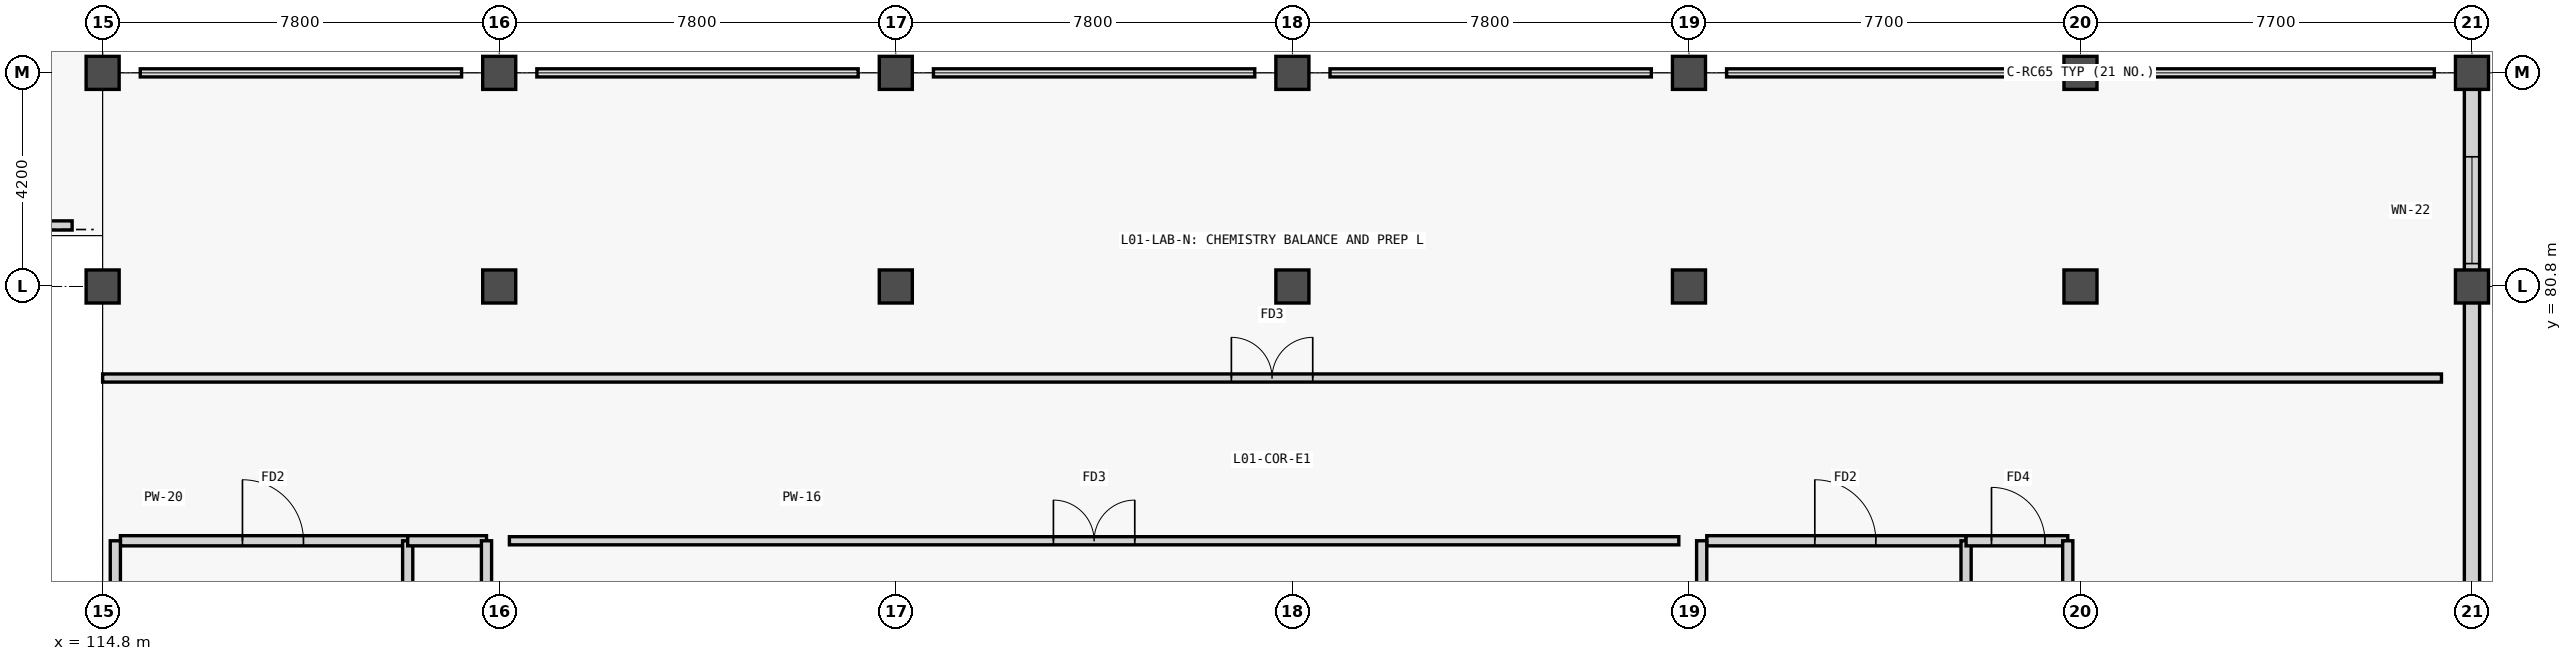
"""IFC4 building model, lengths in metres.
Left out: names, types, materials, properties, quantities, classifications, styles, units other than length and angle.
Written with IfcOpenShell. Run it as: python <this file> out.ifc"""

import sys

from ifc_helpers import new_model, si_unit, direction, frame, frame_2d, origin, origin_2d, place, context, subcontext, project, spatial, rectangle, extrude, element, fill, save


model = new_model("IFC4")
c1 = context("Model", 3, precision=1e-05, world=origin(), true_north=direction((0.0, 1.0)))
c2 = subcontext(c1, "Body", "Model", "MODEL_VIEW")
j1 = project(units=[si_unit("LENGTHUNIT", "METRE"), si_unit("PLANEANGLEUNIT", "RADIAN")], contexts=[c1])
p1 = place(None, origin())
s1 = spatial("IfcSite", under=j1, at=p1, CompositionType="ELEMENT")
p2 = place(p1, origin())
s2 = spatial("IfcBuilding", under=s1, at=p2, CompositionType="ELEMENT")
p3 = place(p2, frame((0.0, 0.0, 5.4)))
s3 = spatial("IfcBuildingStorey", under=s2, at=p3, CompositionType="ELEMENT", Elevation=5.4)
for number, where, z_axis, x_axis in (
    (1, (114.8, 80.8, 0.0), (0.0, 0.0, 1.0), (1.0, 0.0, 0.0)),
    (2, (114.8, 85.0, 0.0), (0.0, 0.0, 1.0), (1.0, 0.0, 0.0)),
    (3, (122.6, 80.8, 0.0), (0.0, 0.0, 1.0), (1.0, 0.0, 0.0)),
    (4, (122.6, 85.0, 0.0), (0.0, 0.0, 1.0), (1.0, 0.0, 0.0)),
    (5, (130.4, 80.8, 0.0), (0.0, 0.0, 1.0), (1.0, 0.0, 0.0)),
    (6, (130.4, 85.0, 0.0), (0.0, 0.0, 1.0), (1.0, 0.0, 0.0)),
    (7, (138.2, 80.8, 0.0), (0.0, 0.0, 1.0), (1.0, 0.0, 0.0)),
    (8, (138.2, 85.0, 0.0), (0.0, 0.0, 1.0), (1.0, 0.0, 0.0)),
    (9, (146.0, 80.8, 0.0), (0.0, 0.0, 1.0), (1.0, 0.0, 0.0)),
    (10, (146.0, 85.0, 0.0), (0.0, 0.0, 1.0), (1.0, 0.0, 0.0)),
    (11, (153.7, 80.8, 0.0), (0.0, 0.0, 1.0), (1.0, 0.0, 0.0)),
    (12, (153.7, 85.0, 0.0), (0.0, 0.0, 1.0), (1.0, 0.0, 0.0)),
    (13, (161.4, 80.8, 0.0), (0.0, 0.0, 1.0), (1.0, 0.0, 0.0)),
    (14, (161.4, 85.0, 0.0), (0.0, 0.0, 1.0), (1.0, 0.0, 0.0)),
):
    element("IfcColumn", number, at=place(p3, frame(where, z_axis=z_axis, x_axis=x_axis)), inside=s3, PredefinedType="COLUMN", context=c2, shape_type="SweptSolid", body=[
        extrude(rectangle(XDim=0.65, YDim=0.65, at=origin_2d()), origin(), (0.0, 0.0, 1.0), 4.8),
    ])
p4 = place(p3, frame((161.4, 84.677, 0.0), z_axis=(0.0, 0.0, 1.0), x_axis=(0.0, -1.0, 0.0)))
e15 = element("IfcWall", 15, at=p4, inside=s3, PredefinedType="SOLIDWALL", context=c2, shape_type="SweptSolid", body=[
    extrude(rectangle(XDim=20.354, YDim=0.3, at=frame_2d((10.177, 0.0))), origin(), (0.0, 0.0, 1.0), 3.85),
])
p5 = place(p4, frame((1.327, 0.0, 0.95)))
e16 = element("IfcOpeningElement", 16, at=p5, cuts=e15, PredefinedType="OPENING", context=c2, shape_type="SweptSolid", body=[
    extrude(rectangle(XDim=2.1, YDim=1.6, at=frame_2d((1.05, 0.8))), frame((0.0, 0.16, 0.0), z_axis=(0.0, -1.0, 0.0), x_axis=(1.0, 0.0, 0.0)), (0.0, 0.0, 1.0), 0.32),
])
p6 = place(p4, frame((14.727, 0.0, 0.95)))
e17 = element("IfcOpeningElement", 17, at=p6, cuts=e15, PredefinedType="OPENING", context=c2, shape_type="SweptSolid", body=[
    extrude(rectangle(XDim=2.4, YDim=1.65, at=frame_2d((1.2, 0.825))), frame((0.0, 0.16, 0.0), z_axis=(0.0, -1.0, 0.0), x_axis=(1.0, 0.0, 0.0)), (0.0, 0.0, 1.0), 0.32),
])
p7 = place(p3, frame((115.15, 75.8, 0.0), z_axis=(0.0, 0.0, 1.0), x_axis=(1.0, 0.0, 0.0)))
e18 = element("IfcWall", 18, at=p7, inside=s3, PredefinedType="PARTITIONING", context=c2, shape_type="SweptSolid", body=[
    extrude(rectangle(XDim=5.65, YDim=0.2, at=frame_2d((2.825, 0.0))), origin(), (0.0, 0.0, 1.0), 4.52),
])
p8 = place(p7, frame((2.4, 0.0, 0.0)))
e19 = element("IfcOpeningElement", 19, at=p8, cuts=e18, PredefinedType="OPENING", context=c2, shape_type="SweptSolid", body=[
    extrude(rectangle(XDim=1.2, YDim=2.2, at=frame_2d((0.6, 1.1))), frame((0.0, 0.11, 0.0), z_axis=(0.0, -1.0, 0.0), x_axis=(1.0, 0.0, 0.0)), (0.0, 0.0, 1.0), 0.22),
])
p9 = place(p3, frame((115.05, 72.4, 0.0), z_axis=(0.0, 0.0, 1.0), x_axis=(0.0, 1.0, 0.0)))
e20 = element("IfcWall", 20, at=p9, inside=s3, PredefinedType="PARTITIONING", context=c2, shape_type="SweptSolid", body=[
    extrude(rectangle(XDim=3.4, YDim=0.2, at=frame_2d((1.7, 0.0))), origin(), (0.0, 0.0, 1.0), 3.85),
])
p10 = place(p3, frame((120.8, 72.4, 0.0), z_axis=(0.0, 0.0, 1.0), x_axis=(0.0, 1.0, 0.0)))
e21 = element("IfcWall", 21, at=p10, inside=s3, PredefinedType="PARTITIONING", context=c2, shape_type="SweptSolid", body=[
    extrude(rectangle(XDim=3.4, YDim=0.2, at=frame_2d((1.7, 0.0))), origin(), (0.0, 0.0, 1.0), 4.52),
])
p11 = place(p10, frame((1.1, 0.0, 0.0)))
e22 = element("IfcOpeningElement", 22, at=p11, cuts=e21, PredefinedType="OPENING", context=c2, shape_type="SweptSolid", body=[
    extrude(rectangle(XDim=1.2, YDim=2.2, at=frame_2d((0.6, 1.1))), frame((0.0, 0.11, 0.0), z_axis=(0.0, -1.0, 0.0), x_axis=(1.0, 0.0, 0.0)), (0.0, 0.0, 1.0), 0.22),
])
p12 = place(p3, frame((120.8, 75.8, 0.0), z_axis=(0.0, 0.0, 1.0), x_axis=(1.0, 0.0, 0.0)))
e23 = element("IfcWall", 23, at=p12, inside=s3, PredefinedType="PARTITIONING", context=c2, shape_type="SweptSolid", body=[
    extrude(rectangle(XDim=1.55, YDim=0.2, at=frame_2d((0.775, 0.0))), origin(), (0.0, 0.0, 1.0), 4.52),
])
p13 = place(p3, frame((122.35, 72.4, 0.0), z_axis=(0.0, 0.0, 1.0), x_axis=(0.0, 1.0, 0.0)))
e24 = element("IfcWall", 24, at=p13, inside=s3, PredefinedType="PARTITIONING", context=c2, shape_type="SweptSolid", body=[
    extrude(rectangle(XDim=3.4, YDim=0.2, at=frame_2d((1.7, 0.0))), origin(), (0.0, 0.0, 1.0), 3.85),
])
p14 = place(p3, frame((146.35, 75.8, 0.0), z_axis=(0.0, 0.0, 1.0), x_axis=(1.0, 0.0, 0.0)))
e25 = element("IfcWall", 25, at=p14, inside=s3, PredefinedType="PARTITIONING", context=c2, shape_type="SweptSolid", body=[
    extrude(rectangle(XDim=5.1, YDim=0.2, at=frame_2d((2.55, 0.0))), origin(), (0.0, 0.0, 1.0), 4.52),
])
p15 = place(p14, frame((2.125, 0.0, 0.0)))
e26 = element("IfcOpeningElement", 26, at=p15, cuts=e25, PredefinedType="OPENING", context=c2, shape_type="SweptSolid", body=[
    extrude(rectangle(XDim=1.2, YDim=2.2, at=frame_2d((0.6, 1.1))), frame((0.0, 0.11, 0.0), z_axis=(0.0, -1.0, 0.0), x_axis=(1.0, 0.0, 0.0)), (0.0, 0.0, 1.0), 0.22),
])
p16 = place(p3, frame((146.25, 72.4, 0.0), z_axis=(0.0, 0.0, 1.0), x_axis=(0.0, 1.0, 0.0)))
e27 = element("IfcWall", 27, at=p16, inside=s3, PredefinedType="PARTITIONING", context=c2, shape_type="SweptSolid", body=[
    extrude(rectangle(XDim=3.4, YDim=0.2, at=frame_2d((1.7, 0.0))), origin(), (0.0, 0.0, 1.0), 3.85),
])
p17 = place(p3, frame((151.45, 72.4, 0.0), z_axis=(0.0, 0.0, 1.0), x_axis=(0.0, 1.0, 0.0)))
e28 = element("IfcWall", 28, at=p17, inside=s3, PredefinedType="PARTITIONING", context=c2, shape_type="SweptSolid", body=[
    extrude(rectangle(XDim=3.4, YDim=0.2, at=frame_2d((1.7, 0.0))), origin(), (0.0, 0.0, 1.0), 4.52),
])
p18 = place(p17, frame((1.1, 0.0, 0.0)))
e29 = element("IfcOpeningElement", 29, at=p18, cuts=e28, PredefinedType="OPENING", context=c2, shape_type="SweptSolid", body=[
    extrude(rectangle(XDim=1.2, YDim=2.2, at=frame_2d((0.6, 1.1))), frame((0.0, 0.11, 0.0), z_axis=(0.0, -1.0, 0.0), x_axis=(1.0, 0.0, 0.0)), (0.0, 0.0, 1.0), 0.22),
])
p19 = place(p3, frame((151.45, 75.8, 0.0), z_axis=(0.0, 0.0, 1.0), x_axis=(1.0, 0.0, 0.0)))
e30 = element("IfcWall", 30, at=p19, inside=s3, PredefinedType="PARTITIONING", context=c2, shape_type="SweptSolid", body=[
    extrude(rectangle(XDim=2.0, YDim=0.2, at=frame_2d((1.0, 0.0))), origin(), (0.0, 0.0, 1.0), 4.52),
])
p20 = place(p19, frame((0.5, 0.0, 0.0)))
e31 = element("IfcOpeningElement", 31, at=p20, cuts=e30, PredefinedType="OPENING", context=c2, shape_type="SweptSolid", body=[
    extrude(rectangle(XDim=1.05, YDim=2.15, at=frame_2d((0.525, 1.075))), frame((0.0, 0.11, 0.0), z_axis=(0.0, -1.0, 0.0), x_axis=(1.0, 0.0, 0.0)), (0.0, 0.0, 1.0), 0.22),
])
p21 = place(p3, frame((153.45, 72.4, 0.0), z_axis=(0.0, 0.0, 1.0), x_axis=(0.0, 1.0, 0.0)))
e32 = element("IfcWall", 32, at=p21, inside=s3, PredefinedType="PARTITIONING", context=c2, shape_type="SweptSolid", body=[
    extrude(rectangle(XDim=3.4, YDim=0.2, at=frame_2d((1.7, 0.0))), origin(), (0.0, 0.0, 1.0), 3.85),
])
p22 = place(p3, frame((89.8, 82.0, 0.0), z_axis=(0.0, 0.0, 1.0), x_axis=(1.0, 0.0, 0.0)))
e33 = element("IfcWall", 33, at=p22, inside=s3, PredefinedType="PARTITIONING", context=c2, shape_type="SweptSolid", body=[
    extrude(rectangle(XDim=24.4, YDim=0.18, at=frame_2d((12.2, 0.0))), origin(), (0.0, 0.0, 1.0), 4.54),
])
p23 = place(p3, frame((122.8, 75.8, 0.0), z_axis=(0.0, 0.0, 1.0), x_axis=(1.0, 0.0, 0.0)))
e34 = element("IfcWall", 34, at=p23, inside=s3, PredefinedType="PARTITIONING", context=c2, shape_type="SweptSolid", body=[
    extrude(rectangle(XDim=23.0, YDim=0.16, at=frame_2d((11.5, 0.0))), origin(), (0.0, 0.0, 1.0), 4.54),
])
p24 = place(p23, frame((10.7, 0.0, 0.0)))
e35 = element("IfcOpeningElement", 35, at=p24, cuts=e34, PredefinedType="OPENING", context=c2, shape_type="SweptSolid", body=[
    extrude(rectangle(XDim=1.6, YDim=2.2, at=frame_2d((0.8, 1.1))), frame((0.0, 0.09, 0.0), z_axis=(0.0, -1.0, 0.0), x_axis=(1.0, 0.0, 0.0)), (0.0, 0.0, 1.0), 0.18),
])
p25 = place(p3, frame((114.8, 79.0, 0.0), z_axis=(0.0, 0.0, 1.0), x_axis=(1.0, 0.0, 0.0)))
e36 = element("IfcWall", 36, at=p25, inside=s3, PredefinedType="PARTITIONING", context=c2, shape_type="SweptSolid", body=[
    extrude(rectangle(XDim=46.0, YDim=0.16, at=frame_2d((23.0, 0.0))), origin(), (0.0, 0.0, 1.0), 4.54),
])
p26 = place(p25, frame((22.2, 0.0, 0.0)))
e37 = element("IfcOpeningElement", 37, at=p26, cuts=e36, PredefinedType="OPENING", context=c2, shape_type="SweptSolid", body=[
    extrude(rectangle(XDim=1.6, YDim=2.2, at=frame_2d((0.8, 1.1))), frame((0.0, 0.09, 0.0), z_axis=(0.0, -1.0, 0.0), x_axis=(1.0, 0.0, 0.0)), (0.0, 0.0, 1.0), 0.18),
])
p27 = place(p5, origin())
e38 = element("IfcWindow", 38, at=p27, inside=s3, PartitioningType="SINGLE_PANEL", PredefinedType="WINDOW", context=c2, shape_type="SweptSolid", body=[
    extrude(rectangle(XDim=2.1, YDim=1.6, at=frame_2d((1.05, 0.8))), frame((0.0, 0.03, 0.0), z_axis=(0.0, -1.0, 0.0), x_axis=(1.0, 0.0, 0.0)), (0.0, 0.0, 1.0), 0.06),
])
fill(e16, e38)
p28 = place(p8, origin())
e39 = element("IfcDoor", 39, at=p28, inside=s3, OperationType="SINGLE_SWING_LEFT", PredefinedType="DOOR", context=c2, shape_type="SweptSolid", body=[
    extrude(rectangle(XDim=1.2, YDim=2.2, at=frame_2d((0.6, 1.1))), frame((0.0, 0.025, 0.0), z_axis=(0.0, -1.0, 0.0), x_axis=(1.0, 0.0, 0.0)), (0.0, 0.0, 1.0), 0.05),
])
fill(e19, e39)
p29 = place(p15, origin())
e40 = element("IfcDoor", 40, at=p29, inside=s3, OperationType="SINGLE_SWING_LEFT", PredefinedType="DOOR", context=c2, shape_type="SweptSolid", body=[
    extrude(rectangle(XDim=1.2, YDim=2.2, at=frame_2d((0.6, 1.1))), frame((0.0, 0.025, 0.0), z_axis=(0.0, -1.0, 0.0), x_axis=(1.0, 0.0, 0.0)), (0.0, 0.0, 1.0), 0.05),
])
fill(e26, e40)
p30 = place(p20, origin())
e41 = element("IfcDoor", 41, at=p30, inside=s3, OperationType="SINGLE_SWING_LEFT", PredefinedType="DOOR", context=c2, shape_type="SweptSolid", body=[
    extrude(rectangle(XDim=1.05, YDim=2.15, at=frame_2d((0.525, 1.075))), frame((0.0, 0.025, 0.0), z_axis=(0.0, -1.0, 0.0), x_axis=(1.0, 0.0, 0.0)), (0.0, 0.0, 1.0), 0.05),
])
fill(e31, e41)
p31 = place(p24, origin())
e42 = element("IfcDoor", 42, at=p31, inside=s3, OperationType="DOUBLE_DOOR_SINGLE_SWING", PredefinedType="DOOR", context=c2, shape_type="SweptSolid", body=[
    extrude(rectangle(XDim=1.6, YDim=2.2, at=frame_2d((0.8, 1.1))), frame((0.0, 0.025, 0.0), z_axis=(0.0, -1.0, 0.0), x_axis=(1.0, 0.0, 0.0)), (0.0, 0.0, 1.0), 0.05),
])
fill(e35, e42)
p32 = place(p26, origin())
e43 = element("IfcDoor", 43, at=p32, inside=s3, OperationType="DOUBLE_DOOR_SINGLE_SWING", PredefinedType="DOOR", context=c2, shape_type="SweptSolid", body=[
    extrude(rectangle(XDim=1.6, YDim=2.2, at=frame_2d((0.8, 1.1))), frame((0.0, 0.025, 0.0), z_axis=(0.0, -1.0, 0.0), x_axis=(1.0, 0.0, 0.0)), (0.0, 0.0, 1.0), 0.05),
])
fill(e37, e43)
save(model, sys.argv[1])
